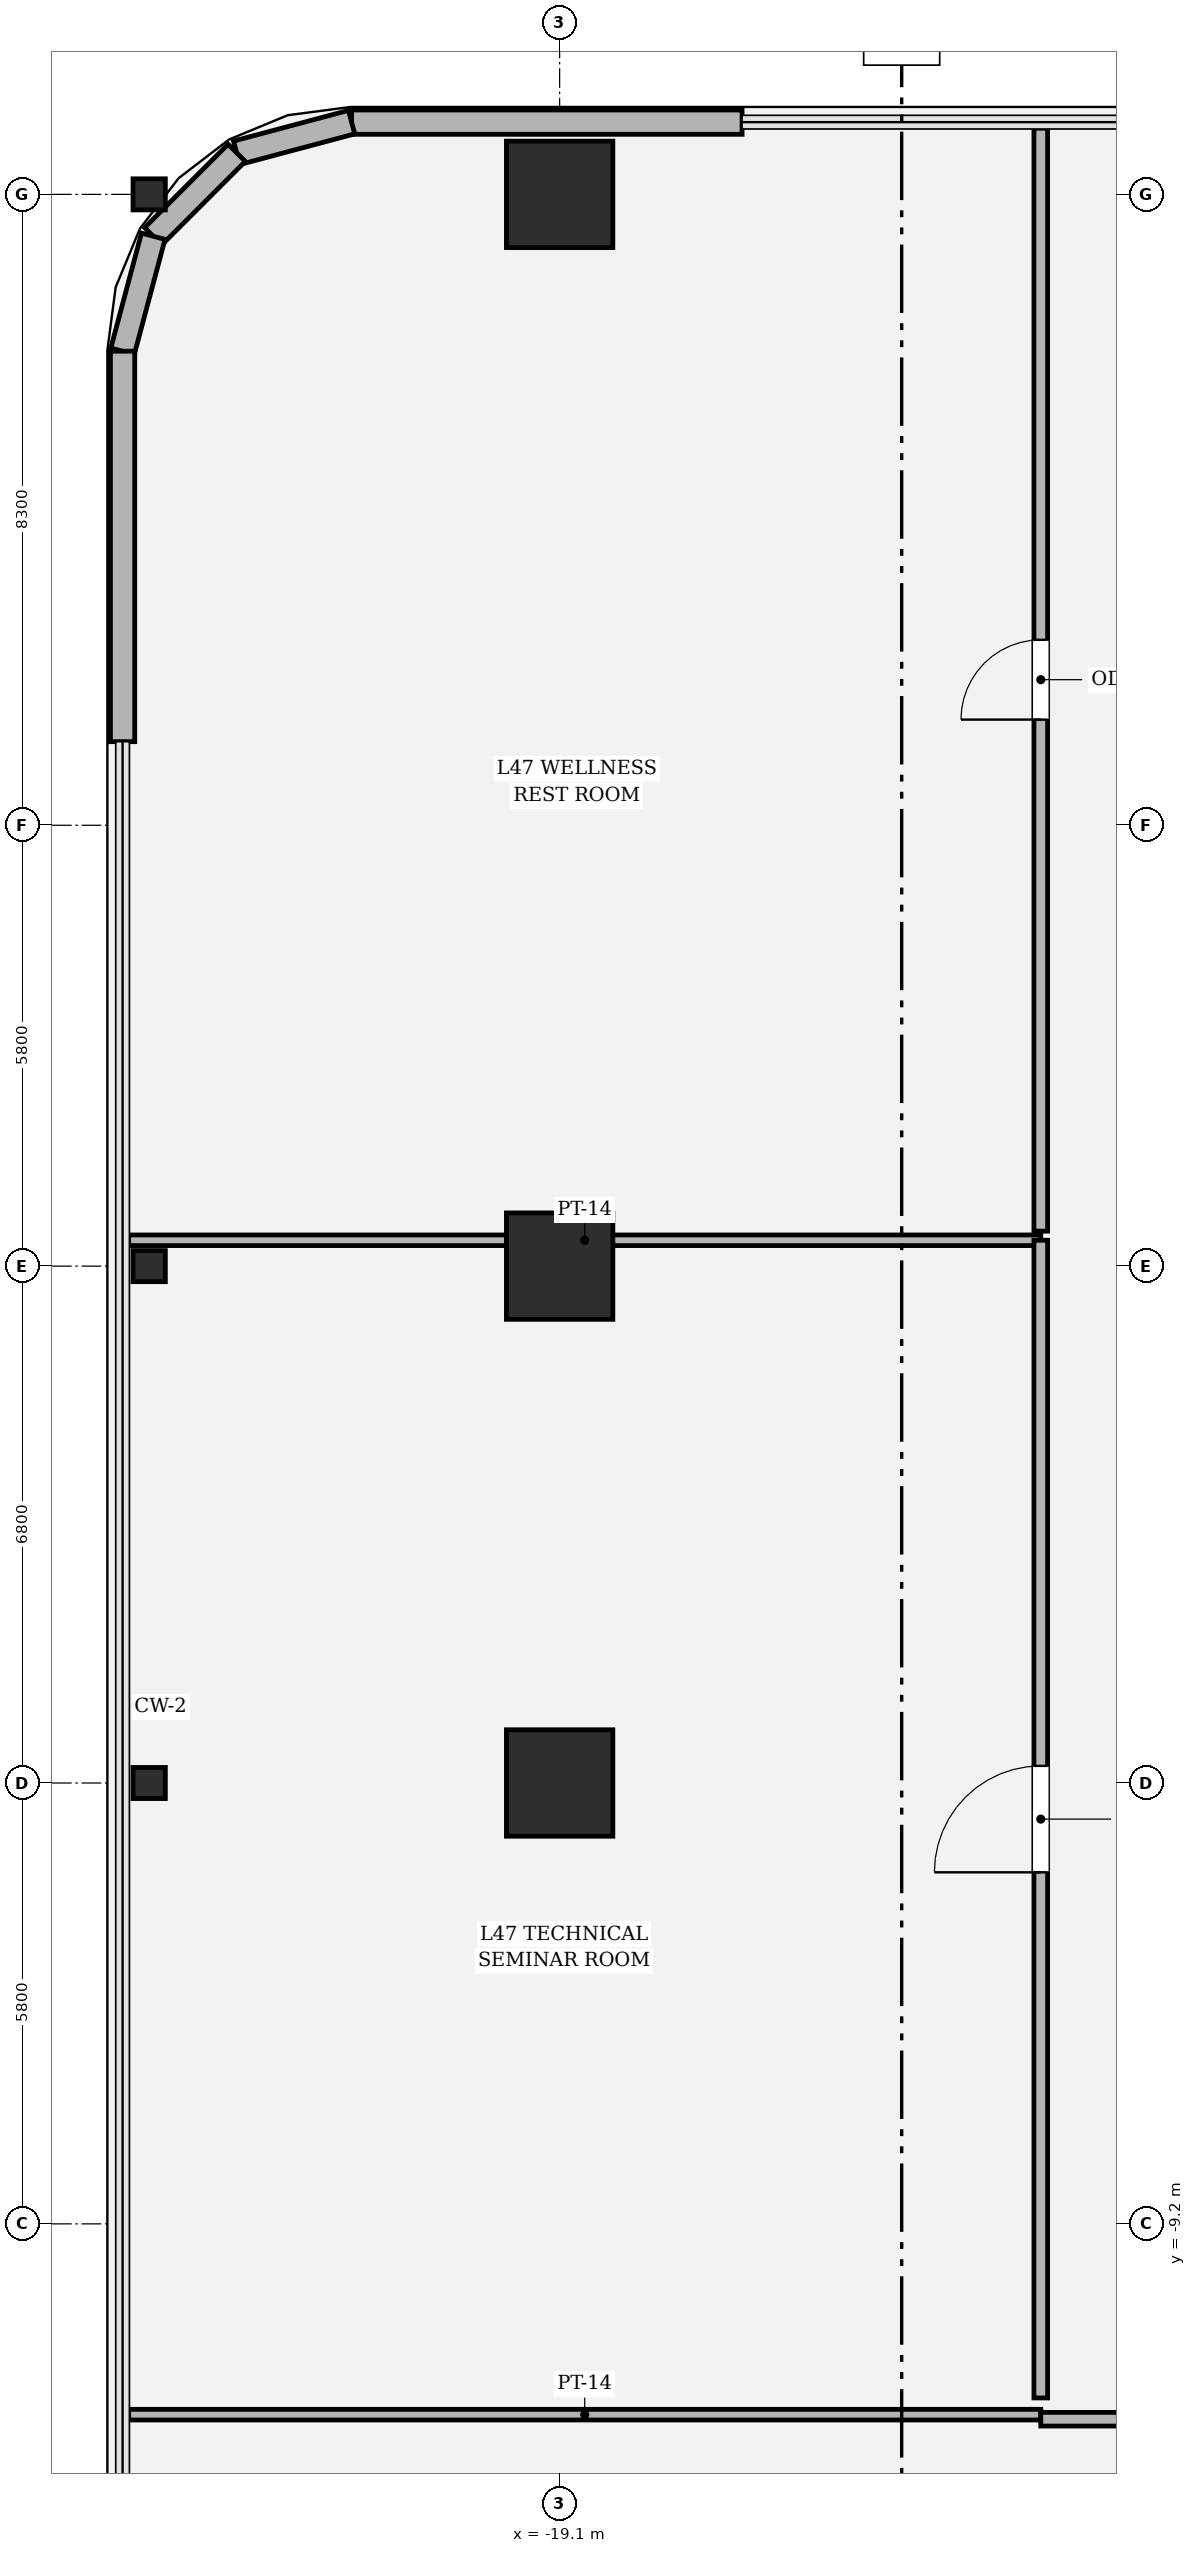
"""IFC4 building model, lengths in metres.
Left out: names, types, materials, properties, quantities, classifications, styles, units other than length and angle.
Written with IfcOpenShell. Run it as: python <this file> out.ifc"""

import sys

from ifc_helpers import new_model, si_unit, direction, frame, frame_2d, origin, origin_2d, place, context, subcontext, project, spatial, rectangle, hollow_rectangle, i_section, extrude, element, fill, save


model = new_model("IFC4")
c1 = context("Model", 3, precision=1e-05, world=origin(), true_north=direction((0.0, 1.0)))
c2 = subcontext(c1, "Body", "Model", "MODEL_VIEW")
j1 = project(units=[si_unit("LENGTHUNIT", "METRE"), si_unit("PLANEANGLEUNIT", "RADIAN")], contexts=[c1])
p1 = place(None, origin())
s1 = spatial("IfcSite", under=j1, at=p1, CompositionType="ELEMENT")
p2 = place(p1, origin())
s2 = spatial("IfcBuilding", under=s1, at=p2, CompositionType="ELEMENT")
p3 = place(p2, frame((0.0, 0.0, 200.55)))
s3 = spatial("IfcBuildingStorey", under=s2, at=p3, CompositionType="ELEMENT", Elevation=200.55)
for number, where, z_axis, x_axis in (
    (1, (-19.1, 17.5, 0.0), (0.0, 0.0, 1.0), (1.0, 0.0, 0.0)),
    (2, (-19.1, 3.4, 0.0), (0.0, 0.0, 1.0), (1.0, 0.0, 0.0)),
    (3, (-19.1, -3.4, 0.0), (0.0, 0.0, 1.0), (1.0, 0.0, 0.0)),
):
    element("IfcColumn", number, at=place(p3, frame(where, z_axis=z_axis, x_axis=x_axis)), inside=s3, PredefinedType="COLUMN", context=c2, shape_type="SweptSolid", body=[
        extrude(hollow_rectangle(XDim=1.4, YDim=1.4, WallThickness=0.042, at=origin_2d()), origin(), (0.0, 0.0, 1.0), 4.05),
    ])
for number, where, z_axis, x_axis in (
    (4, (-24.5, -3.4, 0.0), (0.0, 0.0, 1.0), (0.0, 1.0, 0.0)),
    (5, (-24.5, 3.4, 0.0), (0.0, 0.0, 1.0), (0.0, 1.0, 0.0)),
    (6, (-24.5, 17.5, 0.0), (0.0, 0.0, 1.0), (0.0, 1.0, 0.0)),
):
    element("IfcColumn", number, at=place(p3, frame(where, z_axis=z_axis, x_axis=x_axis)), inside=s3, PredefinedType="COLUMN", context=c2, shape_type="SweptSolid", body=[
        extrude(i_section(OverallWidth=0.409, OverallDepth=0.425, WebThickness=0.032, FlangeThickness=0.052, FilletRadius=0.018, at=origin_2d()), origin(), (0.0, 0.0, 1.0), 4.048),
    ])
p4 = place(p3, frame((-16.7, 18.45, 0.0), z_axis=(0.0, 0.0, 1.0), x_axis=(-1.0, 0.0, 0.0)))
e7 = element("IfcWall", 7, at=p4, inside=s3, PredefinedType="SOLIDWALL", context=c2, shape_type="SweptSolid", body=[
    extrude(rectangle(XDim=5.137, YDim=0.32, at=frame_2d((2.568, 0.0))), origin(), (0.0, 0.0, 1.0), 3.77),
])
p5 = place(p3, frame((-21.837, 18.45, 0.0), z_axis=(0.0, 0.0, 1.0), x_axis=(-0.966224582397, -0.257701486942, 0.0)))
e8 = element("IfcWall", 8, at=p5, inside=s3, PredefinedType="SOLIDWALL", context=c2, shape_type="SweptSolid", body=[
    extrude(rectangle(XDim=1.565, YDim=0.32, at=frame_2d((0.783, 0.0))), origin(), (0.0, 0.0, 1.0), 3.77),
])
p6 = place(p3, frame((-23.349, 18.047, 0.0), z_axis=(0.0, 0.0, 1.0), x_axis=(-0.707106781187, -0.707106781187, 0.0)))
e9 = element("IfcWall", 9, at=p6, inside=s3, PredefinedType="SOLIDWALL", context=c2, shape_type="SweptSolid", body=[
    extrude(rectangle(XDim=1.552, YDim=0.32, at=frame_2d((0.776, 0.0))), origin(), (0.0, 0.0, 1.0), 3.77),
])
p7 = place(p3, frame((-24.447, 16.949, 0.0), z_axis=(0.0, 0.0, 1.0), x_axis=(-0.257847112249, -0.966185730957, 0.0)))
e10 = element("IfcWall", 10, at=p7, inside=s3, PredefinedType="SOLIDWALL", context=c2, shape_type="SweptSolid", body=[
    extrude(rectangle(XDim=1.565, YDim=0.32, at=frame_2d((0.783, 0.0))), origin(), (0.0, 0.0, 1.0), 3.77),
])
p8 = place(p3, frame((-24.85, 15.437, 0.0), z_axis=(0.0, 0.0, 1.0), x_axis=(0.0, -1.0, 0.0)))
e11 = element("IfcWall", 11, at=p8, inside=s3, PredefinedType="SOLIDWALL", context=c2, shape_type="SweptSolid", body=[
    extrude(rectangle(XDim=5.137, YDim=0.32, at=frame_2d((2.568, 0.0))), origin(), (0.0, 0.0, 1.0), 3.77),
])
p9 = place(p3, frame((-24.77, -11.71, 0.0), z_axis=(0.0, 0.0, 1.0), x_axis=(1.0, 0.0, 0.0)))
e12 = element("IfcWall", 12, at=p9, inside=s3, PredefinedType="PARTITIONING", context=c2, shape_type="SweptSolid", body=[
    extrude(rectangle(XDim=12.0, YDim=0.14, at=frame_2d((6.0, 0.0))), origin(), (0.0, 0.0, 1.0), 2.444),
])
p10 = place(p3, frame((-12.77, -11.77, 0.0), z_axis=(0.0, 0.0, 1.0), x_axis=(1.0, 0.0, 0.0)))
e13 = element("IfcWall", 13, at=p10, inside=s3, PredefinedType="PARTITIONING", context=c2, shape_type="SweptSolid", body=[
    extrude(rectangle(XDim=3.365, YDim=0.18, at=frame_2d((1.683, 0.0))), origin(), (0.0, 0.0, 1.0), 2.444),
])
p11 = place(p10, frame((1.157, 0.0, 0.0)))
e14 = element("IfcOpeningElement", 14, at=p11, cuts=e13, PredefinedType="OPENING", context=c2, shape_type="SweptSolid", body=[
    extrude(rectangle(XDim=1.05, YDim=2.2, at=frame_2d((0.525, 1.1))), frame((0.0, 0.1, 0.0), z_axis=(0.0, -1.0, 0.0), x_axis=(1.0, 0.0, 0.0)), (0.0, 0.0, 1.0), 0.2),
])
p12 = place(p3, frame((-24.77, 3.74, 0.0), z_axis=(0.0, 0.0, 1.0), x_axis=(1.0, 0.0, 0.0)))
e15 = element("IfcWall", 15, at=p12, inside=s3, PredefinedType="PARTITIONING", context=c2, shape_type="SweptSolid", body=[
    extrude(rectangle(XDim=12.0, YDim=0.14, at=frame_2d((6.0, 0.0))), origin(), (0.0, 0.0, 1.0), 2.444),
])
p13 = place(p3, frame((-12.77, 3.74, 0.0), z_axis=(0.0, 0.0, 1.0), x_axis=(0.0, -1.0, 0.0)))
e16 = element("IfcWall", 16, at=p13, inside=s3, PredefinedType="PARTITIONING", context=c2, shape_type="SweptSolid", body=[
    extrude(rectangle(XDim=15.23, YDim=0.18, at=frame_2d((7.615, 0.0))), origin(), (0.0, 0.0, 1.0), 2.444),
])
p14 = place(p13, frame((6.915, 0.0, 0.0)))
e17 = element("IfcOpeningElement", 17, at=p14, cuts=e16, PredefinedType="OPENING", context=c2, shape_type="SweptSolid", body=[
    extrude(rectangle(XDim=1.4, YDim=2.25, at=frame_2d((0.7, 1.125))), frame((0.0, 0.1, 0.0), z_axis=(0.0, -1.0, 0.0), x_axis=(1.0, 0.0, 0.0)), (0.0, 0.0, 1.0), 0.2),
])
p15 = place(p3, frame((-12.77, 18.37, 0.0), z_axis=(0.0, 0.0, 1.0), x_axis=(0.0, -1.0, 0.0)))
e18 = element("IfcWall", 18, at=p15, inside=s3, PredefinedType="PARTITIONING", context=c2, shape_type="SweptSolid", body=[
    extrude(rectangle(XDim=14.51, YDim=0.18, at=frame_2d((7.255, 0.0))), origin(), (0.0, 0.0, 1.0), 2.444),
])
p16 = place(p15, frame((6.73, 0.0, 0.0)))
e19 = element("IfcOpeningElement", 19, at=p16, cuts=e18, PredefinedType="OPENING", context=c2, shape_type="SweptSolid", body=[
    extrude(rectangle(XDim=1.05, YDim=2.2, at=frame_2d((0.525, 1.1))), frame((0.0, 0.1, 0.0), z_axis=(0.0, -1.0, 0.0), x_axis=(1.0, 0.0, 0.0)), (0.0, 0.0, 1.0), 0.2),
])
p17 = place(p14, origin())
e20 = element("IfcDoor", 20, at=p17, inside=s3, OperationType="SINGLE_SWING_RIGHT", PredefinedType="DOOR", context=c2, shape_type="SweptSolid", body=[
    extrude(rectangle(XDim=1.4, YDim=2.25, at=frame_2d((0.7, 1.125))), frame((0.0, 0.025, 0.0), z_axis=(0.0, -1.0, 0.0), x_axis=(1.0, 0.0, 0.0)), (0.0, 0.0, 1.0), 0.05),
])
fill(e17, e20)
p18 = place(p16, origin())
e21 = element("IfcDoor", 21, at=p18, inside=s3, OperationType="SINGLE_SWING_RIGHT", PredefinedType="DOOR", context=c2, shape_type="SweptSolid", body=[
    extrude(rectangle(XDim=1.05, YDim=2.2, at=frame_2d((0.525, 1.1))), frame((0.0, 0.025, 0.0), z_axis=(0.0, -1.0, 0.0), x_axis=(1.0, 0.0, 0.0)), (0.0, 0.0, 1.0), 0.05),
])
fill(e19, e21)
save(model, sys.argv[1])
